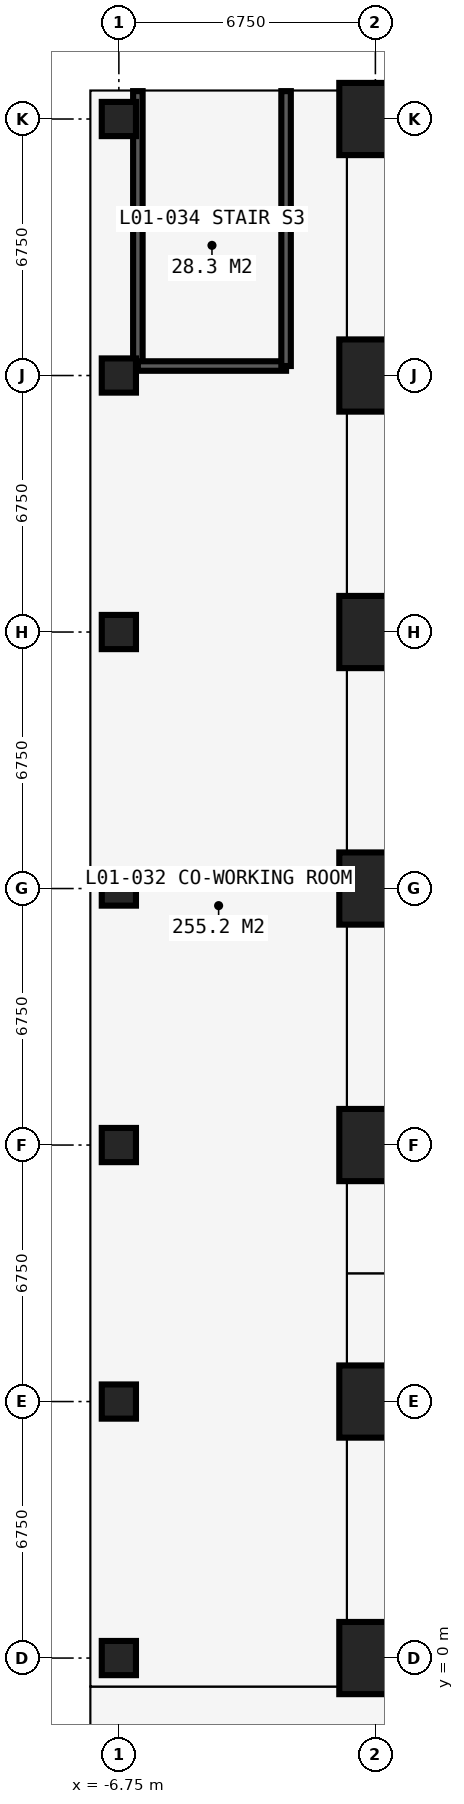
"""IFC4 building model, lengths in metres.
Left out: names, types, materials, properties, quantities, classifications, styles, units other than length and angle.
Written with IfcOpenShell. Run it as: python <this file> out.ifc"""

import sys

from ifc_helpers import new_model, si_unit, direction, frame, frame_2d, origin, origin_2d, place, context, subcontext, project, spatial, rectangle, circle, extrude, element, fill, save


model = new_model("IFC4")
c1 = context("Model", 3, precision=1e-05, world=origin(), true_north=direction((0.0, 1.0)))
c2 = subcontext(c1, "Body", "Model", "MODEL_VIEW")
j1 = project(units=[si_unit("LENGTHUNIT", "METRE"), si_unit("PLANEANGLEUNIT", "RADIAN")], contexts=[c1])
p1 = place(None, origin())
s1 = spatial("IfcSite", under=j1, at=p1, CompositionType="ELEMENT")
p2 = place(p1, origin())
s2 = spatial("IfcBuilding", under=s1, at=p2, CompositionType="ELEMENT")
p3 = place(p2, frame((0.0, 0.0, 4.5)))
s3 = spatial("IfcBuildingStorey", under=s2, at=p3, CompositionType="ELEMENT", Elevation=4.5)
for number, where, z_axis, x_axis in (
    (1, (-6.75, 0.0, 0.0), (0.0, 0.0, 1.0), (1.0, 0.0, 0.0)),
    (2, (-6.75, 6.75, 0.0), (0.0, 0.0, 1.0), (1.0, 0.0, 0.0)),
    (3, (-6.75, 13.5, 0.0), (0.0, 0.0, 1.0), (1.0, 0.0, 0.0)),
    (4, (-6.75, 20.25, 0.0), (0.0, 0.0, 1.0), (1.0, 0.0, 0.0)),
    (5, (-6.75, 27.0, 0.0), (0.0, 0.0, 1.0), (1.0, 0.0, 0.0)),
    (6, (-6.75, 33.75, 0.0), (0.0, 0.0, 1.0), (1.0, 0.0, 0.0)),
    (7, (-6.75, 40.5, 0.0), (0.0, 0.0, 1.0), (1.0, 0.0, 0.0)),
):
    element("IfcColumn", number, at=place(p3, frame(where, z_axis=z_axis, x_axis=x_axis)), inside=s3, PredefinedType="COLUMN", context=c2, shape_type="SweptSolid", body=[
        extrude(circle(Radius=0.45, at=origin_2d()), origin(), (0.0, 0.0, 1.0), 4.5),
    ])
for number, where, z_axis, x_axis in (
    (8, (0.0, 0.0, 0.0), (0.0, 0.0, 1.0), (1.0, 0.0, 0.0)),
    (9, (0.0, 6.75, 0.0), (0.0, 0.0, 1.0), (1.0, 0.0, 0.0)),
    (10, (0.0, 13.5, 0.0), (0.0, 0.0, 1.0), (1.0, 0.0, 0.0)),
    (11, (0.0, 20.25, 0.0), (0.0, 0.0, 1.0), (1.0, 0.0, 0.0)),
    (12, (0.0, 27.0, 0.0), (0.0, 0.0, 1.0), (1.0, 0.0, 0.0)),
    (13, (0.0, 33.75, 0.0), (0.0, 0.0, 1.0), (1.0, 0.0, 0.0)),
    (14, (0.0, 40.5, 0.0), (0.0, 0.0, 1.0), (1.0, 0.0, 0.0)),
):
    element("IfcColumn", number, at=place(p3, frame(where, z_axis=z_axis, x_axis=x_axis)), inside=s3, PredefinedType="COLUMN", context=c2, shape_type="SweptSolid", body=[
        extrude(rectangle(XDim=1.9, YDim=1.9, at=origin_2d()), origin(), (0.0, 0.0, 1.0), 4.5),
    ])
p4 = place(p3, frame((-7.484, -0.75, 0.0), z_axis=(0.0, 0.0, 1.0), x_axis=(1.0, 0.0, 0.0)))
e15 = element("IfcWall", 15, at=p4, inside=s3, PredefinedType="PARTITIONING", context=c2, shape_type="SweptSolid", body=[
    extrude(rectangle(XDim=50.334, YDim=0.15, at=frame_2d((25.167, 0.0))), origin(), (0.0, 0.0, 1.0), 4.25),
])
p5 = place(p4, frame((18.384, 0.0, 0.0)))
e16 = element("IfcOpeningElement", 16, at=p5, cuts=e15, PredefinedType="OPENING", context=c2, shape_type="SweptSolid", body=[
    extrude(rectangle(XDim=1.6, YDim=2.4, at=frame_2d((0.8, 1.2))), frame((0.0, 0.085, 0.0), z_axis=(0.0, -1.0, 0.0), x_axis=(1.0, 0.0, 0.0)), (0.0, 0.0, 1.0), 0.17),
])
p6 = place(p4, frame((35.484, 0.0, 0.0)))
e17 = element("IfcOpeningElement", 17, at=p6, cuts=e15, PredefinedType="OPENING", context=c2, shape_type="SweptSolid", body=[
    extrude(rectangle(XDim=1.6, YDim=2.4, at=frame_2d((0.8, 1.2))), frame((0.0, 0.085, 0.0), z_axis=(0.0, -1.0, 0.0), x_axis=(1.0, 0.0, 0.0)), (0.0, 0.0, 1.0), 0.17),
])
p7 = place(p3, frame((-6.25, 34.0, 0.0), z_axis=(0.0, 0.0, 1.0), x_axis=(0.0, 1.0, 0.0)))
e18 = element("IfcWall", 18, at=p7, inside=s3, PredefinedType="SOLIDWALL", context=c2, shape_type="SweptSolid", body=[
    extrude(rectangle(XDim=7.234, YDim=0.25, at=frame_2d((3.617, 0.0))), origin(), (0.0, 0.0, 1.0), 4.25),
])
p8 = place(p3, frame((-6.25, 34.0, 0.0), z_axis=(0.0, 0.0, 1.0), x_axis=(1.0, 0.0, 0.0)))
e19 = element("IfcWall", 19, at=p8, inside=s3, PredefinedType="SOLIDWALL", context=c2, shape_type="SweptSolid", body=[
    extrude(rectangle(XDim=3.9, YDim=0.25, at=frame_2d((1.95, 0.0))), origin(), (0.0, 0.0, 1.0), 4.25),
])
p9 = place(p8, frame((1.35, 0.0, 0.0)))
e20 = element("IfcOpeningElement", 20, at=p9, cuts=e19, PredefinedType="OPENING", context=c2, shape_type="SweptSolid", body=[
    extrude(rectangle(XDim=1.2, YDim=2.2, at=frame_2d((0.6, 1.1))), frame((0.0, 0.135, 0.0), z_axis=(0.0, -1.0, 0.0), x_axis=(1.0, 0.0, 0.0)), (0.0, 0.0, 1.0), 0.27),
])
p10 = place(p3, frame((-2.35, 34.0, 0.0), z_axis=(0.0, 0.0, 1.0), x_axis=(0.0, 1.0, 0.0)))
e21 = element("IfcWall", 21, at=p10, inside=s3, PredefinedType="SOLIDWALL", context=c2, shape_type="SweptSolid", body=[
    extrude(rectangle(XDim=7.234, YDim=0.25, at=frame_2d((3.617, 0.0))), origin(), (0.0, 0.0, 1.0), 4.25),
])
p11 = place(p3, frame((-0.75, -0.75, 0.0), z_axis=(0.0, 0.0, 1.0), x_axis=(0.0, 1.0, 0.0)))
e22 = element("IfcWall", 22, at=p11, inside=s3, PredefinedType="PARTITIONING", context=c2, shape_type="SweptSolid", body=[
    extrude(rectangle(XDim=41.984, YDim=0.15, at=frame_2d((20.992, 0.0))), origin(), (0.0, 0.0, 1.0), 4.25),
])
p12 = place(p11, frame((4.65, 0.0, 0.0)))
e23 = element("IfcOpeningElement", 23, at=p12, cuts=e22, PredefinedType="OPENING", context=c2, shape_type="SweptSolid", body=[
    extrude(rectangle(XDim=1.6, YDim=2.4, at=frame_2d((0.8, 1.2))), frame((0.0, 0.085, 0.0), z_axis=(0.0, -1.0, 0.0), x_axis=(1.0, 0.0, 0.0)), (0.0, 0.0, 1.0), 0.17),
])
p13 = place(p3, frame((-0.75, 10.125, 0.0), z_axis=(0.0, 0.0, 1.0), x_axis=(1.0, 0.0, 0.0)))
e24 = element("IfcWall", 24, at=p13, inside=s3, PredefinedType="PARTITIONING", context=c2, shape_type="SweptSolid", body=[
    extrude(rectangle(XDim=10.875, YDim=0.15, at=frame_2d((5.438, 0.0))), origin(), (0.0, 0.0, 1.0), 4.25),
])
p14 = place(p12, origin())
e25 = element("IfcDoor", 25, at=p14, inside=s3, OperationType="DOUBLE_DOOR_SINGLE_SWING", PredefinedType="DOOR", context=c2, shape_type="SweptSolid", body=[
    extrude(rectangle(XDim=1.6, YDim=2.4, at=frame_2d((0.8, 1.2))), frame((0.0, 0.025, 0.0), z_axis=(0.0, -1.0, 0.0), x_axis=(1.0, 0.0, 0.0)), (0.0, 0.0, 1.0), 0.05),
])
fill(e23, e25)
p15 = place(p9, origin())
e26 = element("IfcDoor", 26, at=p15, inside=s3, OperationType="SINGLE_SWING_LEFT", PredefinedType="DOOR", context=c2, shape_type="SweptSolid", body=[
    extrude(rectangle(XDim=1.2, YDim=2.2, at=frame_2d((0.6, 1.1))), frame((0.0, 0.025, 0.0), z_axis=(0.0, -1.0, 0.0), x_axis=(1.0, 0.0, 0.0)), (0.0, 0.0, 1.0), 0.05),
])
fill(e20, e26)
save(model, sys.argv[1])
